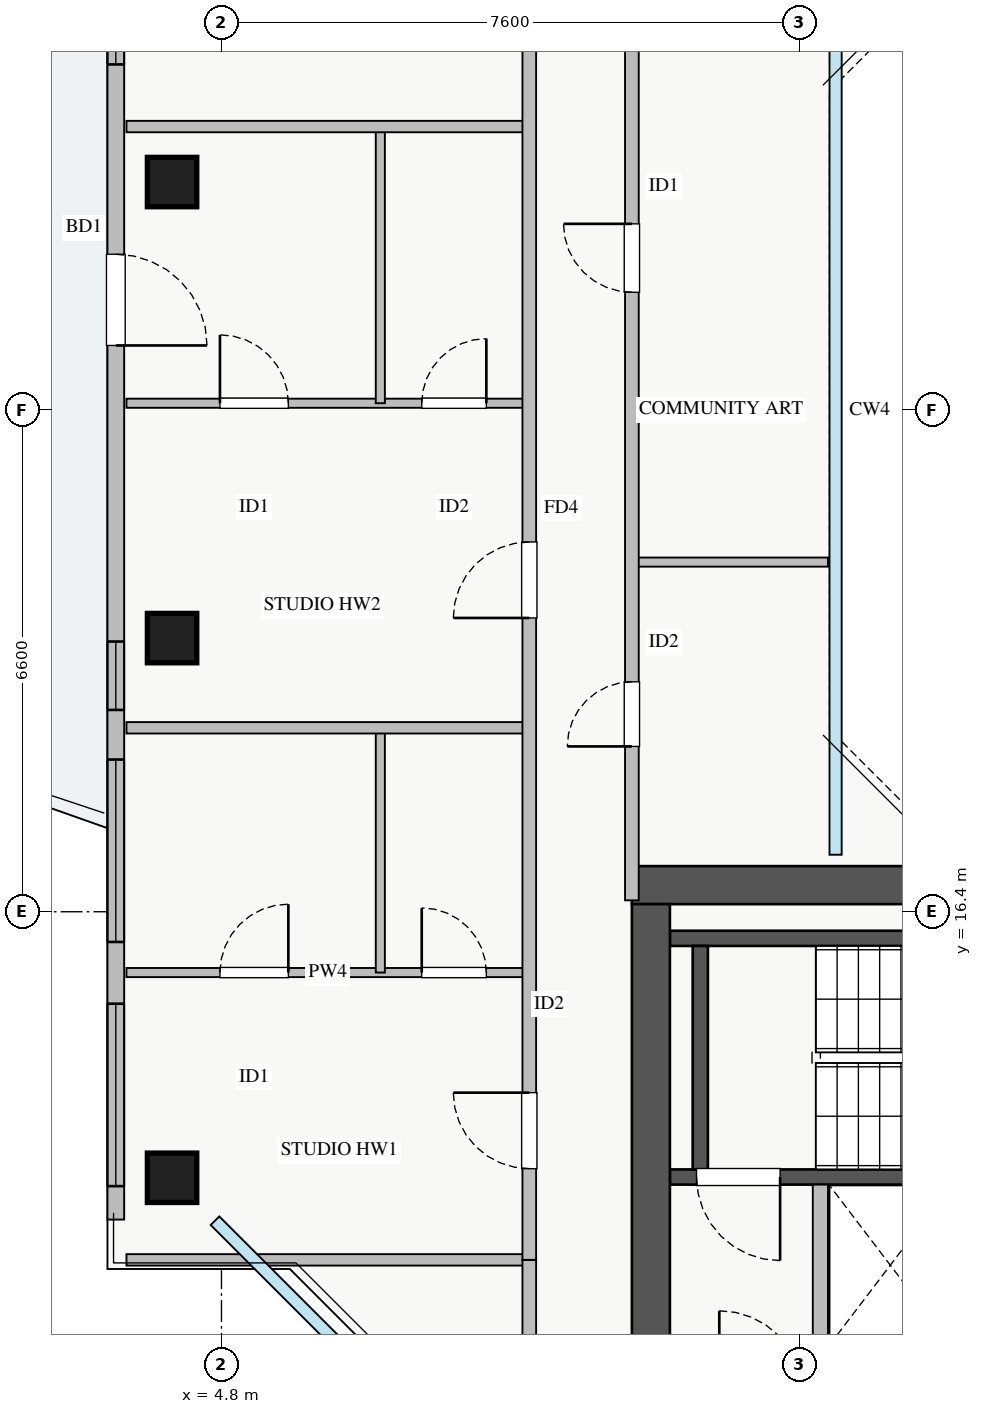
"""IFC4 building model, lengths in metres.
Left out: names, types, materials, properties, quantities, classifications, styles, units other than length and angle.
Written with IfcOpenShell. Run it as: python <this file> out.ifc"""

import sys

from ifc_helpers import new_model, si_unit, direction, frame, frame_2d, origin, origin_2d, place, context, subcontext, project, spatial, rectangle, extrude, source, transform, mapped, element, fill, save


model = new_model("IFC4")
c1 = context("Model", 3, precision=1e-05, world=origin(), true_north=direction((0.0, 1.0)))
c2 = subcontext(c1, "Body", "Model", "MODEL_VIEW")
j1 = project(units=[si_unit("LENGTHUNIT", "METRE"), si_unit("PLANEANGLEUNIT", "RADIAN")], contexts=[c1])
p1 = place(None, origin())
s1 = spatial("IfcSite", under=j1, at=p1, CompositionType="ELEMENT")
p2 = place(p1, origin())
s2 = spatial("IfcBuilding", under=s1, at=p2, CompositionType="ELEMENT")
p3 = place(p2, frame((0.0, 0.0, 256.75)))
s3 = spatial("IfcBuildingStorey", under=s2, at=p3, CompositionType="ELEMENT", Elevation=256.75)
p4 = place(p3, frame((12.68, 12.8, 0.0), z_axis=(0.0, 0.0, 1.0), x_axis=(1.0, 0.0, 0.0)))
e1 = element("IfcWall", 1, at=p4, inside=s3, PredefinedType="SHEAR", context=c2, shape_type="SweptSolid", body=[
    extrude(rectangle(XDim=1.94, YDim=0.18, at=frame_2d((0.97, 0.0))), origin(), (0.0, 0.0, 1.0), 3.07),
])
p5 = place(p3, frame((10.7, 12.91, 0.0), z_axis=(0.0, 0.0, 1.0), x_axis=(1.0, 0.0, 0.0)))
e2 = element("IfcWall", 2, at=p5, inside=s3, PredefinedType="SHEAR", context=c2, shape_type="SweptSolid", body=[
    extrude(rectangle(XDim=7.45, YDim=0.2, at=frame_2d((3.725, 0.0))), origin(), (0.0, 0.0, 1.0), 3.25),
])
p6 = place(p5, frame((0.35, 0.0, 0.0)))
e3 = element("IfcOpeningElement", 3, at=p6, cuts=e2, PredefinedType="OPENING", context=c2, shape_type="SweptSolid", body=[
    extrude(rectangle(XDim=1.1, YDim=2.05, at=frame_2d((0.55, 1.025))), frame((0.0, 0.11, 0.0), z_axis=(0.0, -1.0, 0.0), x_axis=(1.0, 0.0, 0.0)), (0.0, 0.0, 1.0), 0.22),
])
p7 = place(p3, frame((10.7, 16.05, 0.0), z_axis=(0.0, 0.0, 1.0), x_axis=(1.0, 0.0, 0.0)))
e4 = element("IfcWall", 4, at=p7, inside=s3, PredefinedType="SHEAR", context=c2, shape_type="SweptSolid", body=[
    extrude(rectangle(XDim=7.45, YDim=0.2, at=frame_2d((3.725, 0.0))), origin(), (0.0, 0.0, 1.0), 3.25),
])
p8 = place(p3, frame((11.1, 13.01, 0.0), z_axis=(0.0, 0.0, 1.0), x_axis=(0.0, 1.0, 0.0)))
e5 = element("IfcWall", 5, at=p8, inside=s3, PredefinedType="SHEAR", context=c2, shape_type="SweptSolid", body=[
    extrude(rectangle(XDim=2.94, YDim=0.2, at=frame_2d((1.47, 0.0))), origin(), (0.0, 0.0, 1.0), 3.25),
])
p9 = place(p3, frame((10.2, 16.75, 0.0), z_axis=(0.0, 0.0, 1.0), x_axis=(1.0, 0.0, 0.0)))
e6 = element("IfcWall", 6, at=p9, inside=s3, PredefinedType="SHEAR", context=c2, shape_type="SweptSolid", body=[
    extrude(rectangle(XDim=17.6, YDim=0.5, at=frame_2d((8.8, 0.0))), origin(), (0.0, 0.0, 1.0), 3.25),
])
p10 = place(p3, frame((10.45, 10.3, 0.0), z_axis=(0.0, 0.0, 1.0), x_axis=(0.0, 1.0, 0.0)))
e7 = element("IfcWall", 7, at=p10, inside=s3, PredefinedType="SHEAR", context=c2, shape_type="SweptSolid", body=[
    extrude(rectangle(XDim=6.2, YDim=0.5, at=frame_2d((3.1, 0.0))), origin(), (0.0, 0.0, 1.0), 3.25),
])
m1 = source(origin(), c2, "Body", "SweptSolid", [
    extrude(rectangle(XDim=0.65, YDim=0.65, at=origin_2d()), origin(), (0.0, 0.0, 1.0), 3.25),
])
for number, where, z_axis, x_axis in (
    (8, (4.15, 26.0, 0.0), (0.0, 0.0, 1.0), (1.0, 0.0, 0.0)),
    (9, (4.15, 20.0, 0.0), (0.0, 0.0, 1.0), (1.0, 0.0, 0.0)),
    (10, (4.15, 12.9, 0.0), (0.0, 0.0, 1.0), (1.0, 0.0, 0.0)),
):
    element("IfcColumn", number, at=place(p3, frame(where, z_axis=z_axis, x_axis=x_axis)), inside=s3, PredefinedType="COLUMN", context=c2, shape_type="MappedRepresentation", body=[
        mapped(m1, transform((0.0, 0.0, 0.0), x_axis=(1.0, 0.0, 0.0), y_axis=(0.0, 1.0, 0.0), z_axis=(0.0, 0.0, 1.0), scale=1.0)),
    ])
p11 = place(p3, frame((3.41, 12.35, 0.0), z_axis=(0.0, 0.0, 1.0), x_axis=(0.0, 1.0, 0.0)))
e11 = element("IfcWall", 11, at=p11, inside=s3, PredefinedType="STANDARD", context=c2, shape_type="SweptSolid", body=[
    extrude(rectangle(XDim=21.3, YDim=0.22, at=frame_2d((10.65, 0.0))), origin(), (0.0, 0.0, 1.0), 2.61),
])
p12 = place(p11, frame((11.5, 0.0, 0.0)))
e12 = element("IfcOpeningElement", 12, at=p12, cuts=e11, PredefinedType="OPENING", context=c2, shape_type="SweptSolid", body=[
    extrude(rectangle(XDim=1.2, YDim=2.1, at=frame_2d((0.6, 1.05))), frame((0.0, 0.12, 0.0), z_axis=(0.0, -1.0, 0.0), x_axis=(1.0, 0.0, 0.0)), (0.0, 0.0, 1.0), 0.24),
])
p13 = place(p11, frame((0.44, 0.0, 0.9)))
e13 = element("IfcOpeningElement", 13, at=p13, cuts=e11, PredefinedType="OPENING", context=c2, shape_type="SweptSolid", body=[
    extrude(rectangle(XDim=2.4, YDim=1.5, at=frame_2d((1.2, 0.75))), frame((0.0, 0.12, 0.0), z_axis=(0.0, -1.0, 0.0), x_axis=(1.0, 0.0, 0.0)), (0.0, 0.0, 1.0), 0.24),
])
p14 = place(p11, frame((18.785, 0.0, 0.9)))
e14 = element("IfcOpeningElement", 14, at=p14, cuts=e11, PredefinedType="OPENING", context=c2, shape_type="SweptSolid", body=[
    extrude(rectangle(XDim=2.1, YDim=1.5, at=frame_2d((1.05, 0.75))), frame((0.0, 0.12, 0.0), z_axis=(0.0, -1.0, 0.0), x_axis=(1.0, 0.0, 0.0)), (0.0, 0.0, 1.0), 0.24),
])
p15 = place(p11, frame((3.653, 0.0, 0.9)))
e15 = element("IfcOpeningElement", 15, at=p15, cuts=e11, PredefinedType="OPENING", context=c2, shape_type="SweptSolid", body=[
    extrude(rectangle(XDim=2.4, YDim=1.5, at=frame_2d((1.2, 0.75))), frame((0.0, 0.12, 0.0), z_axis=(0.0, -1.0, 0.0), x_axis=(1.0, 0.0, 0.0)), (0.0, 0.0, 1.0), 0.24),
])
p16 = place(p11, frame((15.198, 0.0, 0.9)))
e16 = element("IfcOpeningElement", 16, at=p16, cuts=e11, PredefinedType="OPENING", context=c2, shape_type="SweptSolid", body=[
    extrude(rectangle(XDim=2.4, YDim=1.5, at=frame_2d((1.2, 0.75))), frame((0.0, 0.12, 0.0), z_axis=(0.0, -1.0, 0.0), x_axis=(1.0, 0.0, 0.0)), (0.0, 0.0, 1.0), 0.24),
])
p17 = place(p11, frame((6.705, 0.0, 0.9)))
e17 = element("IfcOpeningElement", 17, at=p17, cuts=e11, PredefinedType="OPENING", context=c2, shape_type="SweptSolid", body=[
    extrude(rectangle(XDim=0.9, YDim=1.2, at=frame_2d((0.45, 0.6))), frame((0.0, 0.12, 0.0), z_axis=(0.0, -1.0, 0.0), x_axis=(1.0, 0.0, 0.0)), (0.0, 0.0, 1.0), 0.24),
])
p18 = place(p3, frame((12.68, 10.6, 0.0), z_axis=(0.0, 0.0, 1.0), x_axis=(0.0, 1.0, 0.0)))
e18 = element("IfcWall", 18, at=p18, inside=s3, PredefinedType="PARTITIONING", context=c2, shape_type="SweptSolid", body=[
    extrude(rectangle(XDim=2.21, YDim=0.2, at=frame_2d((1.105, 0.0))), origin(), (0.0, 0.0, 1.0), 3.07),
])
p19 = place(p3, frame((3.55, 11.82, 0.0), z_axis=(0.0, 0.0, 1.0), x_axis=(1.0, 0.0, 0.0)))
e19 = element("IfcWall", 19, at=p19, inside=s3, PredefinedType="PARTITIONING", context=c2, shape_type="SweptSolid", body=[
    extrude(rectangle(XDim=5.3, YDim=0.15, at=frame_2d((2.65, 0.0))), origin(), (0.0, 0.0, 1.0), 3.07),
])
p20 = place(p3, frame((8.85, 8.56, 0.0), z_axis=(0.0, 0.0, 1.0), x_axis=(0.0, 1.0, 0.0)))
e20 = element("IfcWall", 20, at=p20, inside=s3, PredefinedType="PARTITIONING", context=c2, shape_type="SweptSolid", body=[
    extrude(rectangle(XDim=3.26, YDim=0.18, at=frame_2d((1.63, 0.0))), origin(), (0.0, 0.0, 1.0), 2.569),
])
p21 = place(p3, frame((3.55, 15.6, 0.0), z_axis=(0.0, 0.0, 1.0), x_axis=(1.0, 0.0, 0.0)))
e21 = element("IfcWall", 21, at=p21, inside=s3, PredefinedType="PLUMBINGWALL", context=c2, shape_type="SweptSolid", body=[
    extrude(rectangle(XDim=5.3, YDim=0.12, at=frame_2d((2.65, 0.0))), origin(), (0.0, 0.0, 1.0), 3.07),
])
p22 = place(p21, frame((1.23, 0.0, 0.0)))
e22 = element("IfcOpeningElement", 22, at=p22, cuts=e21, PredefinedType="OPENING", context=c2, shape_type="SweptSolid", body=[
    extrude(rectangle(XDim=0.9, YDim=2.05, at=frame_2d((0.45, 1.025))), frame((0.0, 0.07, 0.0), z_axis=(0.0, -1.0, 0.0), x_axis=(1.0, 0.0, 0.0)), (0.0, 0.0, 1.0), 0.14),
])
p23 = place(p21, frame((3.885, 0.0, 0.0)))
e23 = element("IfcOpeningElement", 23, at=p23, cuts=e21, PredefinedType="OPENING", context=c2, shape_type="SweptSolid", body=[
    extrude(rectangle(XDim=0.85, YDim=2.05, at=frame_2d((0.425, 1.025))), frame((0.0, 0.07, 0.0), z_axis=(0.0, -1.0, 0.0), x_axis=(1.0, 0.0, 0.0)), (0.0, 0.0, 1.0), 0.14),
])
p24 = place(p3, frame((6.89, 15.6, 0.0), z_axis=(0.0, 0.0, 1.0), x_axis=(0.0, 1.0, 0.0)))
e24 = element("IfcWall", 24, at=p24, inside=s3, PredefinedType="PLUMBINGWALL", context=c2, shape_type="SweptSolid", body=[
    extrude(rectangle(XDim=3.22, YDim=0.12, at=frame_2d((1.61, 0.0))), origin(), (0.0, 0.0, 1.0), 3.07),
])
p25 = place(p3, frame((3.55, 23.09, 0.0), z_axis=(0.0, 0.0, 1.0), x_axis=(1.0, 0.0, 0.0)))
e25 = element("IfcWall", 25, at=p25, inside=s3, PredefinedType="PLUMBINGWALL", context=c2, shape_type="SweptSolid", body=[
    extrude(rectangle(XDim=5.3, YDim=0.12, at=frame_2d((2.65, 0.0))), origin(), (0.0, 0.0, 1.0), 3.07),
])
p26 = place(p25, frame((1.23, 0.0, 0.0)))
e26 = element("IfcOpeningElement", 26, at=p26, cuts=e25, PredefinedType="OPENING", context=c2, shape_type="SweptSolid", body=[
    extrude(rectangle(XDim=0.9, YDim=2.05, at=frame_2d((0.45, 1.025))), frame((0.0, 0.07, 0.0), z_axis=(0.0, -1.0, 0.0), x_axis=(1.0, 0.0, 0.0)), (0.0, 0.0, 1.0), 0.14),
])
p27 = place(p25, frame((3.885, 0.0, 0.0)))
e27 = element("IfcOpeningElement", 27, at=p27, cuts=e25, PredefinedType="OPENING", context=c2, shape_type="SweptSolid", body=[
    extrude(rectangle(XDim=0.85, YDim=2.05, at=frame_2d((0.425, 1.025))), frame((0.0, 0.07, 0.0), z_axis=(0.0, -1.0, 0.0), x_axis=(1.0, 0.0, 0.0)), (0.0, 0.0, 1.0), 0.14),
])
p28 = place(p3, frame((6.89, 23.09, 0.0), z_axis=(0.0, 0.0, 1.0), x_axis=(0.0, 1.0, 0.0)))
e28 = element("IfcWall", 28, at=p28, inside=s3, PredefinedType="PLUMBINGWALL", context=c2, shape_type="SweptSolid", body=[
    extrude(rectangle(XDim=3.64, YDim=0.12, at=frame_2d((1.82, 0.0))), origin(), (0.0, 0.0, 1.0), 3.07),
])
for number, where, z_axis, x_axis in (
    (29, (3.55, 18.82, 0.0), (0.0, 0.0, 1.0), (1.0, 0.0, 0.0)),
    (30, (3.55, 26.73, 0.0), (0.0, 0.0, 1.0), (1.0, 0.0, 0.0)),
):
    element("IfcWall", number, at=place(p3, frame(where, z_axis=z_axis, x_axis=x_axis)), inside=s3, PredefinedType="PARTITIONING", context=c2, shape_type="SweptSolid", body=[
        extrude(rectangle(XDim=5.3, YDim=0.15, at=frame_2d((2.65, 0.0))), origin(), (0.0, 0.0, 1.0), 3.07),
    ])
p29 = place(p3, frame((8.85, 11.82, 0.0), z_axis=(0.0, 0.0, 1.0), x_axis=(0.0, 1.0, 0.0)))
e31 = element("IfcWall", 31, at=p29, inside=s3, PredefinedType="PARTITIONING", context=c2, shape_type="SweptSolid", body=[
    extrude(rectangle(XDim=22.36, YDim=0.18, at=frame_2d((11.18, 0.0))), origin(), (0.0, 0.0, 1.0), 2.569),
])
p30 = place(p29, frame((1.2, 0.0, 0.0)))
e32 = element("IfcOpeningElement", 32, at=p30, cuts=e31, PredefinedType="OPENING", context=c2, shape_type="SweptSolid", body=[
    extrude(rectangle(XDim=1.0, YDim=2.05, at=frame_2d((0.5, 1.025))), frame((0.0, 0.1, 0.0), z_axis=(0.0, -1.0, 0.0), x_axis=(1.0, 0.0, 0.0)), (0.0, 0.0, 1.0), 0.2),
])
p31 = place(p29, frame((8.445, 0.0, 0.0)))
e33 = element("IfcOpeningElement", 33, at=p31, cuts=e31, PredefinedType="OPENING", context=c2, shape_type="SweptSolid", body=[
    extrude(rectangle(XDim=1.0, YDim=2.05, at=frame_2d((0.5, 1.025))), frame((0.0, 0.1, 0.0), z_axis=(0.0, -1.0, 0.0), x_axis=(1.0, 0.0, 0.0)), (0.0, 0.0, 1.0), 0.2),
])
p32 = place(p29, frame((16.23, 0.0, 0.0)))
e34 = element("IfcOpeningElement", 34, at=p32, cuts=e31, PredefinedType="OPENING", context=c2, shape_type="SweptSolid", body=[
    extrude(rectangle(XDim=1.0, YDim=2.05, at=frame_2d((0.5, 1.025))), frame((0.0, 0.1, 0.0), z_axis=(0.0, -1.0, 0.0), x_axis=(1.0, 0.0, 0.0)), (0.0, 0.0, 1.0), 0.2),
])
p33 = place(p3, frame((10.2, 21.0, 0.0), z_axis=(0.0, 0.0, 1.0), x_axis=(1.0, 0.0, 0.0)))
e35 = element("IfcWall", 35, at=p33, inside=s3, PredefinedType="PLUMBINGWALL", context=c2, shape_type="SweptSolid", body=[
    extrude(rectangle(XDim=2.58, YDim=0.12, at=frame_2d((1.29, 0.0))), origin(), (0.0, 0.0, 1.0), 3.07),
])
p34 = place(p3, frame((10.2, 16.55, 0.0), z_axis=(0.0, 0.0, 1.0), x_axis=(0.0, 1.0, 0.0)))
e36 = element("IfcWall", 36, at=p34, inside=s3, PredefinedType="PARTITIONING", context=c2, shape_type="SweptSolid", body=[
    extrude(rectangle(XDim=12.9, YDim=0.18, at=frame_2d((6.45, 0.0))), origin(), (0.0, 0.0, 1.0), 3.07),
])
p35 = place(p34, frame((2.025, 0.0, 0.0)))
e37 = element("IfcOpeningElement", 37, at=p35, cuts=e36, PredefinedType="OPENING", context=c2, shape_type="SweptSolid", body=[
    extrude(rectangle(XDim=0.85, YDim=2.05, at=frame_2d((0.425, 1.025))), frame((0.0, 0.1, 0.0), z_axis=(0.0, -1.0, 0.0), x_axis=(1.0, 0.0, 0.0)), (0.0, 0.0, 1.0), 0.2),
])
p36 = place(p34, frame((8.0, 0.0, 0.0)))
e38 = element("IfcOpeningElement", 38, at=p36, cuts=e36, PredefinedType="OPENING", context=c2, shape_type="SweptSolid", body=[
    extrude(rectangle(XDim=0.9, YDim=2.05, at=frame_2d((0.45, 1.025))), frame((0.0, 0.1, 0.0), z_axis=(0.0, -1.0, 0.0), x_axis=(1.0, 0.0, 0.0)), (0.0, 0.0, 1.0), 0.2),
])
m2 = source(origin(), c2, "Body", "SweptSolid", [
    extrude(rectangle(XDim=1.2, YDim=2.1, at=frame_2d((0.6, 1.05))), frame((0.0, 0.025, 0.0), z_axis=(0.0, -1.0, 0.0), x_axis=(1.0, 0.0, 0.0)), (0.0, 0.0, 1.0), 0.05),
])
p37 = place(p12, frame((1.2, 0.0, 0.0), z_axis=(0.0, 0.0, 1.0), x_axis=(-1.0, 0.0, 0.0)))
e39 = element("IfcDoor", 39, at=p37, inside=s3, OperationType="SINGLE_SWING_LEFT", PredefinedType="DOOR", context=c2, shape_type="MappedRepresentation", body=[
    mapped(m2, transform((0.0, 0.0, 0.0), x_axis=(1.0, 0.0, 0.0), y_axis=(0.0, 1.0, 0.0), z_axis=(0.0, 0.0, 1.0), scale=1.0)),
])
fill(e12, e39)
m3 = source(origin(), c2, "Body", "SweptSolid", [
    extrude(rectangle(XDim=2.4, YDim=1.5, at=frame_2d((1.2, 0.75))), frame((0.0, 0.03, 0.0), z_axis=(0.0, -1.0, 0.0), x_axis=(1.0, 0.0, 0.0)), (0.0, 0.0, 1.0), 0.06),
])
p38 = place(p13, origin())
e40 = element("IfcWindow", 40, at=p38, inside=s3, PartitioningType="TRIPLE_PANEL_VERTICAL", PredefinedType="WINDOW", context=c2, shape_type="MappedRepresentation", body=[
    mapped(m3, transform((0.0, 0.0, 0.0), x_axis=(1.0, 0.0, 0.0), y_axis=(0.0, 1.0, 0.0), z_axis=(0.0, 0.0, 1.0), scale=1.0)),
])
fill(e13, e40)
m4 = source(origin(), c2, "Body", "SweptSolid", [
    extrude(rectangle(XDim=1.1, YDim=2.05, at=frame_2d((0.55, 1.025))), frame((0.0, 0.025, 0.0), z_axis=(0.0, -1.0, 0.0), x_axis=(1.0, 0.0, 0.0)), (0.0, 0.0, 1.0), 0.05),
])
p39 = place(p6, frame((1.1, 0.0, 0.0), z_axis=(0.0, 0.0, 1.0), x_axis=(-1.0, 0.0, 0.0)))
e41 = element("IfcDoor", 41, at=p39, inside=s3, OperationType="SINGLE_SWING_RIGHT", PredefinedType="DOOR", context=c2, shape_type="MappedRepresentation", body=[
    mapped(m4, transform((0.0, 0.0, 0.0), x_axis=(1.0, 0.0, 0.0), y_axis=(0.0, 1.0, 0.0), z_axis=(0.0, 0.0, 1.0), scale=1.0)),
])
fill(e3, e41)
m5 = source(origin(), c2, "Body", "SweptSolid", [
    extrude(rectangle(XDim=0.9, YDim=2.05, at=frame_2d((0.45, 1.025))), frame((0.0, 0.025, 0.0), z_axis=(0.0, -1.0, 0.0), x_axis=(1.0, 0.0, 0.0)), (0.0, 0.0, 1.0), 0.05),
])
p40 = place(p22, origin())
e42 = element("IfcDoor", 42, at=p40, inside=s3, OperationType="SINGLE_SWING_RIGHT", PredefinedType="DOOR", context=c2, shape_type="MappedRepresentation", body=[
    mapped(m5, transform((0.0, 0.0, 0.0), x_axis=(1.0, 0.0, 0.0), y_axis=(0.0, 1.0, 0.0), z_axis=(0.0, 0.0, 1.0), scale=1.0)),
])
fill(e22, e42)
m6 = source(origin(), c2, "Body", "SweptSolid", [
    extrude(rectangle(XDim=0.85, YDim=2.05, at=frame_2d((0.425, 1.025))), frame((0.0, 0.025, 0.0), z_axis=(0.0, -1.0, 0.0), x_axis=(1.0, 0.0, 0.0)), (0.0, 0.0, 1.0), 0.05),
])
p41 = place(p23, origin())
e43 = element("IfcDoor", 43, at=p41, inside=s3, OperationType="SINGLE_SWING_LEFT", PredefinedType="DOOR", context=c2, shape_type="MappedRepresentation", body=[
    mapped(m6, transform((0.0, 0.0, 0.0), x_axis=(1.0, 0.0, 0.0), y_axis=(0.0, 1.0, 0.0), z_axis=(0.0, 0.0, 1.0), scale=1.0)),
])
fill(e23, e43)
p42 = place(p26, origin())
e44 = element("IfcDoor", 44, at=p42, inside=s3, OperationType="SINGLE_SWING_LEFT", PredefinedType="DOOR", context=c2, shape_type="MappedRepresentation", body=[
    mapped(m5, transform((0.0, 0.0, 0.0), x_axis=(1.0, 0.0, 0.0), y_axis=(0.0, 1.0, 0.0), z_axis=(0.0, 0.0, 1.0), scale=1.0)),
])
fill(e26, e44)
p43 = place(p27, origin())
e45 = element("IfcDoor", 45, at=p43, inside=s3, OperationType="SINGLE_SWING_RIGHT", PredefinedType="DOOR", context=c2, shape_type="MappedRepresentation", body=[
    mapped(m6, transform((0.0, 0.0, 0.0), x_axis=(1.0, 0.0, 0.0), y_axis=(0.0, 1.0, 0.0), z_axis=(0.0, 0.0, 1.0), scale=1.0)),
])
fill(e27, e45)
m7 = source(origin(), c2, "Body", "SweptSolid", [
    extrude(rectangle(XDim=1.0, YDim=2.05, at=frame_2d((0.5, 1.025))), frame((0.0, 0.025, 0.0), z_axis=(0.0, -1.0, 0.0), x_axis=(1.0, 0.0, 0.0)), (0.0, 0.0, 1.0), 0.05),
])
p44 = place(p30, origin())
e46 = element("IfcDoor", 46, at=p44, inside=s3, OperationType="SINGLE_SWING_RIGHT", PredefinedType="DOOR", context=c2, shape_type="MappedRepresentation", body=[
    mapped(m7, transform((0.0, 0.0, 0.0), x_axis=(1.0, 0.0, 0.0), y_axis=(0.0, 1.0, 0.0), z_axis=(0.0, 0.0, 1.0), scale=1.0)),
])
fill(e32, e46)
p45 = place(p31, origin())
e47 = element("IfcDoor", 47, at=p45, inside=s3, OperationType="SINGLE_SWING_LEFT", PredefinedType="DOOR", context=c2, shape_type="MappedRepresentation", body=[
    mapped(m7, transform((0.0, 0.0, 0.0), x_axis=(1.0, 0.0, 0.0), y_axis=(0.0, 1.0, 0.0), z_axis=(0.0, 0.0, 1.0), scale=1.0)),
])
fill(e33, e47)
p46 = place(p35, origin())
e48 = element("IfcDoor", 48, at=p46, inside=s3, OperationType="SINGLE_SWING_LEFT", PredefinedType="DOOR", context=c2, shape_type="MappedRepresentation", body=[
    mapped(m6, transform((0.0, 0.0, 0.0), x_axis=(1.0, 0.0, 0.0), y_axis=(0.0, 1.0, 0.0), z_axis=(0.0, 0.0, 1.0), scale=1.0)),
])
fill(e37, e48)
p47 = place(p36, origin())
e49 = element("IfcDoor", 49, at=p47, inside=s3, OperationType="SINGLE_SWING_RIGHT", PredefinedType="DOOR", context=c2, shape_type="MappedRepresentation", body=[
    mapped(m5, transform((0.0, 0.0, 0.0), x_axis=(1.0, 0.0, 0.0), y_axis=(0.0, 1.0, 0.0), z_axis=(0.0, 0.0, 1.0), scale=1.0)),
])
fill(e38, e49)
p48 = place(p15, origin())
e50 = element("IfcWindow", 50, at=p48, inside=s3, PartitioningType="TRIPLE_PANEL_VERTICAL", PredefinedType="WINDOW", context=c2, shape_type="MappedRepresentation", body=[
    mapped(m3, transform((0.0, 0.0, 0.0), x_axis=(1.0, 0.0, 0.0), y_axis=(0.0, 1.0, 0.0), z_axis=(0.0, 0.0, 1.0), scale=1.0)),
])
fill(e15, e50)
p49 = place(p16, origin())
e51 = element("IfcWindow", 51, at=p49, inside=s3, PartitioningType="TRIPLE_PANEL_VERTICAL", PredefinedType="WINDOW", context=c2, shape_type="MappedRepresentation", body=[
    mapped(m3, transform((0.0, 0.0, 0.0), x_axis=(1.0, 0.0, 0.0), y_axis=(0.0, 1.0, 0.0), z_axis=(0.0, 0.0, 1.0), scale=1.0)),
])
fill(e16, e51)
m8 = source(origin(), c2, "Body", "SweptSolid", [
    extrude(rectangle(XDim=0.9, YDim=1.2, at=frame_2d((0.45, 0.6))), frame((0.0, 0.03, 0.0), z_axis=(0.0, -1.0, 0.0), x_axis=(1.0, 0.0, 0.0)), (0.0, 0.0, 1.0), 0.06),
])
p50 = place(p17, origin())
e52 = element("IfcWindow", 52, at=p50, inside=s3, PartitioningType="SINGLE_PANEL", PredefinedType="WINDOW", context=c2, shape_type="MappedRepresentation", body=[
    mapped(m8, transform((0.0, 0.0, 0.0), x_axis=(1.0, 0.0, 0.0), y_axis=(0.0, 1.0, 0.0), z_axis=(0.0, 0.0, 1.0), scale=1.0)),
])
fill(e17, e52)
save(model, sys.argv[1])
